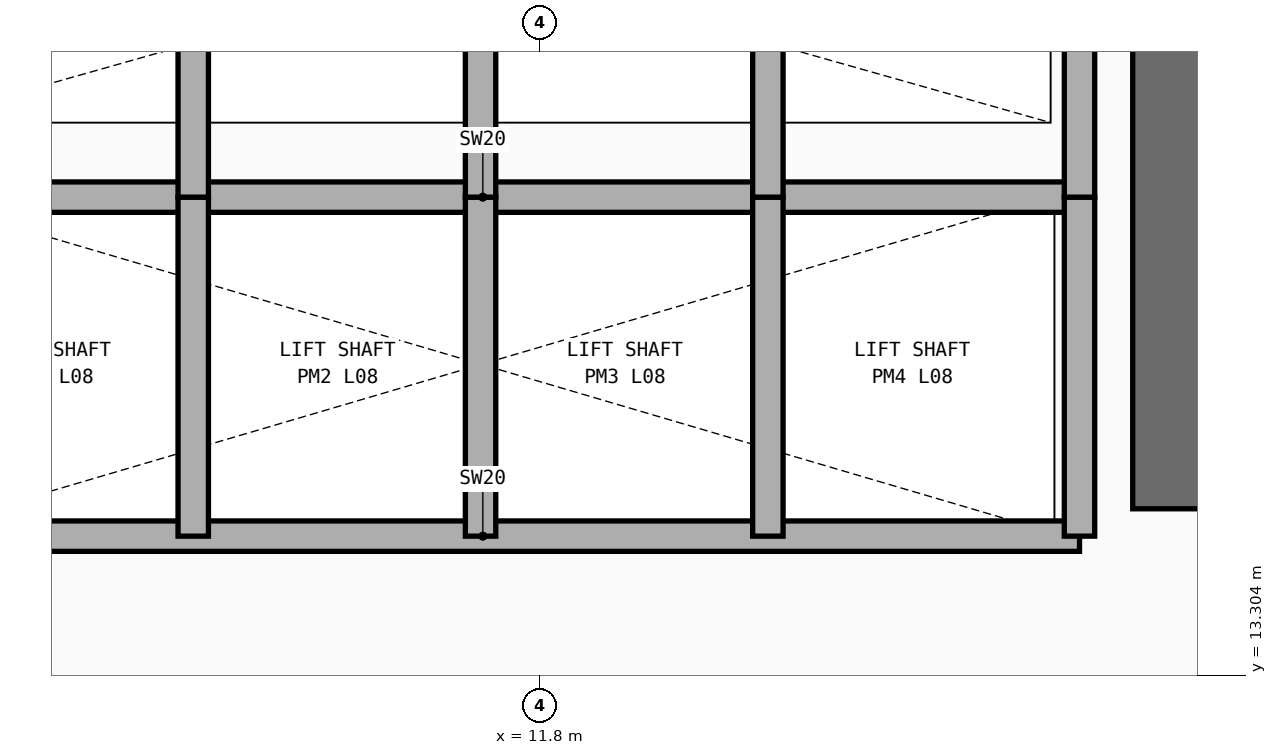
"""IFC4 building model, lengths in metres.
Left out: names, types, materials, properties, quantities, classifications, styles, units other than length and angle.
Written with IfcOpenShell. Run it as: python <this file> out.ifc"""

import sys

from ifc_helpers import new_model, si_unit, direction, frame, frame_2d, origin, place, context, subcontext, project, spatial, rectangle, extrude, element, save


model = new_model("IFC4")
c1 = context("Model", 3, precision=1e-05, world=origin(), true_north=direction((0.0, 1.0)))
c2 = subcontext(c1, "Body", "Model", "MODEL_VIEW")
j1 = project(units=[si_unit("LENGTHUNIT", "METRE"), si_unit("PLANEANGLEUNIT", "RADIAN")], contexts=[c1])
p1 = place(None, origin())
s1 = spatial("IfcSite", under=j1, at=p1, CompositionType="ELEMENT")
p2 = place(p1, origin())
s2 = spatial("IfcBuilding", under=s1, at=p2, CompositionType="ELEMENT")
p3 = place(p2, frame((0.0, 0.0, 33.4)))
s3 = spatial("IfcBuildingStorey", under=s2, at=p3, CompositionType="ELEMENT", Elevation=33.4)
p4 = place(p3, frame((16.05, 14.4, 0.0), z_axis=(0.0, 0.0, 1.0), x_axis=(0.0, 1.0, 0.0)))
e1 = element("IfcWall", 1, at=p4, inside=s3, PredefinedType="SHEAR", context=c2, shape_type="SweptSolid", body=[
    extrude(rectangle(XDim=9.1, YDim=0.7, at=frame_2d((4.55, 0.0))), origin(), (0.0, 0.0, 1.0), 3.54),
])
for number, where, z_axis, x_axis in (
    (2, (7.5, 14.22, 0.0), (0.0, 0.0, 1.0), (1.0, 0.0, 0.0)),
    (3, (7.5, 16.45, 0.0), (0.0, 0.0, 1.0), (1.0, 0.0, 0.0)),
):
    element("IfcWall", number, at=place(p3, frame(where, z_axis=z_axis, x_axis=x_axis)), inside=s3, PredefinedType="PARTITIONING", context=c2, shape_type="SweptSolid", body=[
        extrude(rectangle(XDim=7.85, YDim=0.2, at=frame_2d((3.925, 0.0))), origin(), (0.0, 0.0, 1.0), 3.54),
    ])
for number, where, z_axis, x_axis in (
    (4, (15.35, 14.22, 0.0), (0.0, 0.0, 1.0), (0.0, 1.0, 0.0)),
    (5, (9.52, 14.22, 0.0), (0.0, 0.0, 1.0), (0.0, 1.0, 0.0)),
    (6, (11.41, 14.22, 0.0), (0.0, 0.0, 1.0), (0.0, 1.0, 0.0)),
    (7, (13.3, 14.22, 0.0), (0.0, 0.0, 1.0), (0.0, 1.0, 0.0)),
):
    element("IfcWall", number, at=place(p3, frame(where, z_axis=z_axis, x_axis=x_axis)), inside=s3, PredefinedType="PARTITIONING", context=c2, shape_type="SweptSolid", body=[
        extrude(rectangle(XDim=2.23, YDim=0.2, at=frame_2d((1.115, 0.0))), origin(), (0.0, 0.0, 1.0), 3.54),
    ])
for number, where, z_axis, x_axis in (
    (8, (15.35, 16.45, 0.0), (0.0, 0.0, 1.0), (0.0, 1.0, 0.0)),
    (9, (9.52, 16.45, 0.0), (0.0, 0.0, 1.0), (0.0, 1.0, 0.0)),
    (10, (11.41, 16.45, 0.0), (0.0, 0.0, 1.0), (0.0, 1.0, 0.0)),
    (11, (13.3, 16.45, 0.0), (0.0, 0.0, 1.0), (0.0, 1.0, 0.0)),
):
    element("IfcWall", number, at=place(p3, frame(where, z_axis=z_axis, x_axis=x_axis)), inside=s3, PredefinedType="PARTITIONING", context=c2, shape_type="SweptSolid", body=[
        extrude(rectangle(XDim=2.67, YDim=0.2, at=frame_2d((1.335, 0.0))), origin(), (0.0, 0.0, 1.0), 3.54),
    ])
save(model, sys.argv[1])
